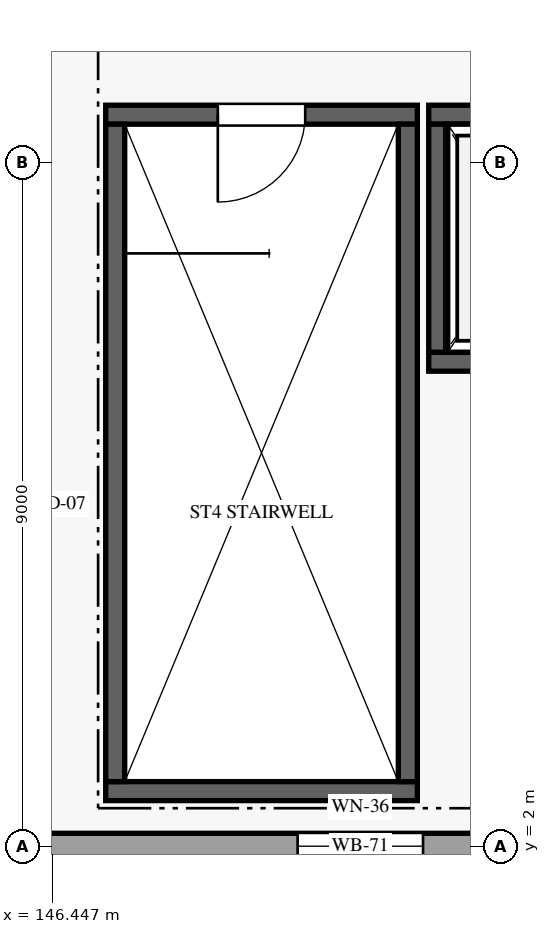
"""IFC4 building model, lengths in metres.
Left out: names, types, materials, properties, quantities, classifications, styles, units other than length and angle.
Written with IfcOpenShell. Run it as: python <this file> out.ifc"""

import sys

from ifc_helpers import new_model, si_unit, direction, frame, frame_2d, origin, place, context, subcontext, project, spatial, rectangle, extrude, element, fill, save


model = new_model("IFC4")
c1 = context("Model", 3, precision=1e-05, world=origin(), true_north=direction((0.0, 1.0)))
c2 = subcontext(c1, "Body", "Model", "MODEL_VIEW")
j1 = project(units=[si_unit("LENGTHUNIT", "METRE"), si_unit("PLANEANGLEUNIT", "RADIAN")], contexts=[c1])
p1 = place(None, origin())
s1 = spatial("IfcSite", under=j1, at=p1, CompositionType="ELEMENT")
p2 = place(p1, origin())
s2 = spatial("IfcBuilding", under=s1, at=p2, CompositionType="ELEMENT")
p3 = place(p2, frame((0.0, 0.0, 15.0)))
s3 = spatial("IfcBuildingStorey", under=s2, at=p3, CompositionType="ELEMENT", Elevation=15.0)
p4 = place(p3, frame((146.12, 2.0, 0.0), z_axis=(0.0, 0.0, 1.0), x_axis=(1.0, 0.0, 0.0)))
e1 = element("IfcWall", 1, at=p4, inside=s3, PredefinedType="STANDARD", context=c2, shape_type="SweptSolid", body=[
    extrude(rectangle(XDim=8.76, YDim=0.34, at=frame_2d((4.38, 0.0))), origin(), (0.0, 0.0, 1.0), 3.855),
])
p5 = place(p4, frame((5.205, 0.0, 0.85), z_axis=(0.0, 0.0, 1.0), x_axis=(-1.0, 0.0, 0.0)))
e2 = element("IfcOpeningElement", 2, at=p5, cuts=e1, PredefinedType="OPENING", context=c2, shape_type="SweptSolid", body=[
    extrude(rectangle(XDim=1.65, YDim=2.0, at=frame_2d((0.825, 1.0))), frame((0.0, 0.18, 0.0), z_axis=(0.0, -1.0, 0.0), x_axis=(1.0, 0.0, 0.0)), (0.0, 0.0, 1.0), 0.36),
])
p6 = place(p3, frame((147.15, 11.625, 0.0), z_axis=(0.0, 0.0, 1.0), x_axis=(1.0, 0.0, 0.0)))
e3 = element("IfcWall", 3, at=p6, inside=s3, PredefinedType="SHEAR", context=c2, shape_type="SweptSolid", body=[
    extrude(rectangle(XDim=4.1, YDim=0.25, at=frame_2d((2.05, 0.0))), origin(), (0.0, 0.0, 1.0), 4.18),
])
p7 = place(p6, frame((2.625, 0.0, 0.0), z_axis=(0.0, 0.0, 1.0), x_axis=(-1.0, 0.0, 0.0)))
e4 = element("IfcOpeningElement", 4, at=p7, cuts=e3, PredefinedType="OPENING", context=c2, shape_type="SweptSolid", body=[
    extrude(rectangle(XDim=1.15, YDim=2.2, at=frame_2d((0.575, 1.1))), frame((0.0, 0.135, 0.0), z_axis=(0.0, -1.0, 0.0), x_axis=(1.0, 0.0, 0.0)), (0.0, 0.0, 1.0), 0.27),
])
p8 = place(p3, frame((147.15, 2.725, 0.0), z_axis=(0.0, 0.0, 1.0), x_axis=(1.0, 0.0, 0.0)))
e5 = element("IfcWall", 5, at=p8, inside=s3, PredefinedType="SHEAR", context=c2, shape_type="SweptSolid", body=[
    extrude(rectangle(XDim=4.1, YDim=0.25, at=frame_2d((2.05, 0.0))), origin(), (0.0, 0.0, 1.0), 4.18),
])
for number, where, z_axis, x_axis in (
    (6, (147.275, 2.85, 0.0), (0.0, 0.0, 1.0), (0.0, 1.0, 0.0)),
    (7, (151.125, 2.85, 0.0), (0.0, 0.0, 1.0), (0.0, 1.0, 0.0)),
):
    element("IfcWall", number, at=place(p3, frame(where, z_axis=z_axis, x_axis=x_axis)), inside=s3, PredefinedType="SHEAR", context=c2, shape_type="SweptSolid", body=[
        extrude(rectangle(XDim=8.65, YDim=0.25, at=frame_2d((4.325, 0.0))), origin(), (0.0, 0.0, 1.0), 4.18),
    ])
p9 = place(p3, frame((151.4, 11.625, 0.0), z_axis=(0.0, 0.0, 1.0), x_axis=(1.0, 0.0, 0.0)))
e8 = element("IfcWall", 8, at=p9, inside=s3, PredefinedType="SHEAR", context=c2, shape_type="SweptSolid", body=[
    extrude(rectangle(XDim=2.5, YDim=0.25, at=frame_2d((1.25, 0.0))), origin(), (0.0, 0.0, 1.0), 4.18),
])
p10 = place(p9, frame((0.7, 0.0, 0.0)))
e9 = element("IfcOpeningElement", 9, at=p10, cuts=e8, PredefinedType="OPENING", context=c2, shape_type="SweptSolid", body=[
    extrude(rectangle(XDim=1.1, YDim=2.2, at=frame_2d((0.55, 1.1))), frame((0.0, 0.135, 0.0), z_axis=(0.0, -1.0, 0.0), x_axis=(1.0, 0.0, 0.0)), (0.0, 0.0, 1.0), 0.27),
])
p11 = place(p3, frame((151.4, 8.375, 0.0), z_axis=(0.0, 0.0, 1.0), x_axis=(1.0, 0.0, 0.0)))
e10 = element("IfcWall", 10, at=p11, inside=s3, PredefinedType="SHEAR", context=c2, shape_type="SweptSolid", body=[
    extrude(rectangle(XDim=2.5, YDim=0.25, at=frame_2d((1.25, 0.0))), origin(), (0.0, 0.0, 1.0), 4.18),
])
p12 = place(p3, frame((151.525, 8.5, 0.0), z_axis=(0.0, 0.0, 1.0), x_axis=(0.0, 1.0, 0.0)))
e11 = element("IfcWall", 11, at=p12, inside=s3, PredefinedType="SHEAR", context=c2, shape_type="SweptSolid", body=[
    extrude(rectangle(XDim=3.0, YDim=0.25, at=frame_2d((1.5, 0.0))), origin(), (0.0, 0.0, 1.0), 4.18),
])
p13 = place(p5, origin())
e12 = element("IfcWindow", 12, at=p13, inside=s3, PartitioningType="SINGLE_PANEL", PredefinedType="WINDOW", context=c2, shape_type="SweptSolid", body=[
    extrude(rectangle(XDim=1.65, YDim=2.0, at=frame_2d((0.825, 1.0))), frame((0.0, 0.03, 0.0), z_axis=(0.0, -1.0, 0.0), x_axis=(1.0, 0.0, 0.0)), (0.0, 0.0, 1.0), 0.06),
])
fill(e2, e12)
p14 = place(p7, origin())
e13 = element("IfcDoor", 13, at=p14, inside=s3, OperationType="SINGLE_SWING_RIGHT", PredefinedType="DOOR", context=c2, shape_type="SweptSolid", body=[
    extrude(rectangle(XDim=1.15, YDim=2.2, at=frame_2d((0.575, 1.1))), frame((0.0, 0.025, 0.0), z_axis=(0.0, -1.0, 0.0), x_axis=(1.0, 0.0, 0.0)), (0.0, 0.0, 1.0), 0.05),
])
fill(e4, e13)
save(model, sys.argv[1])
